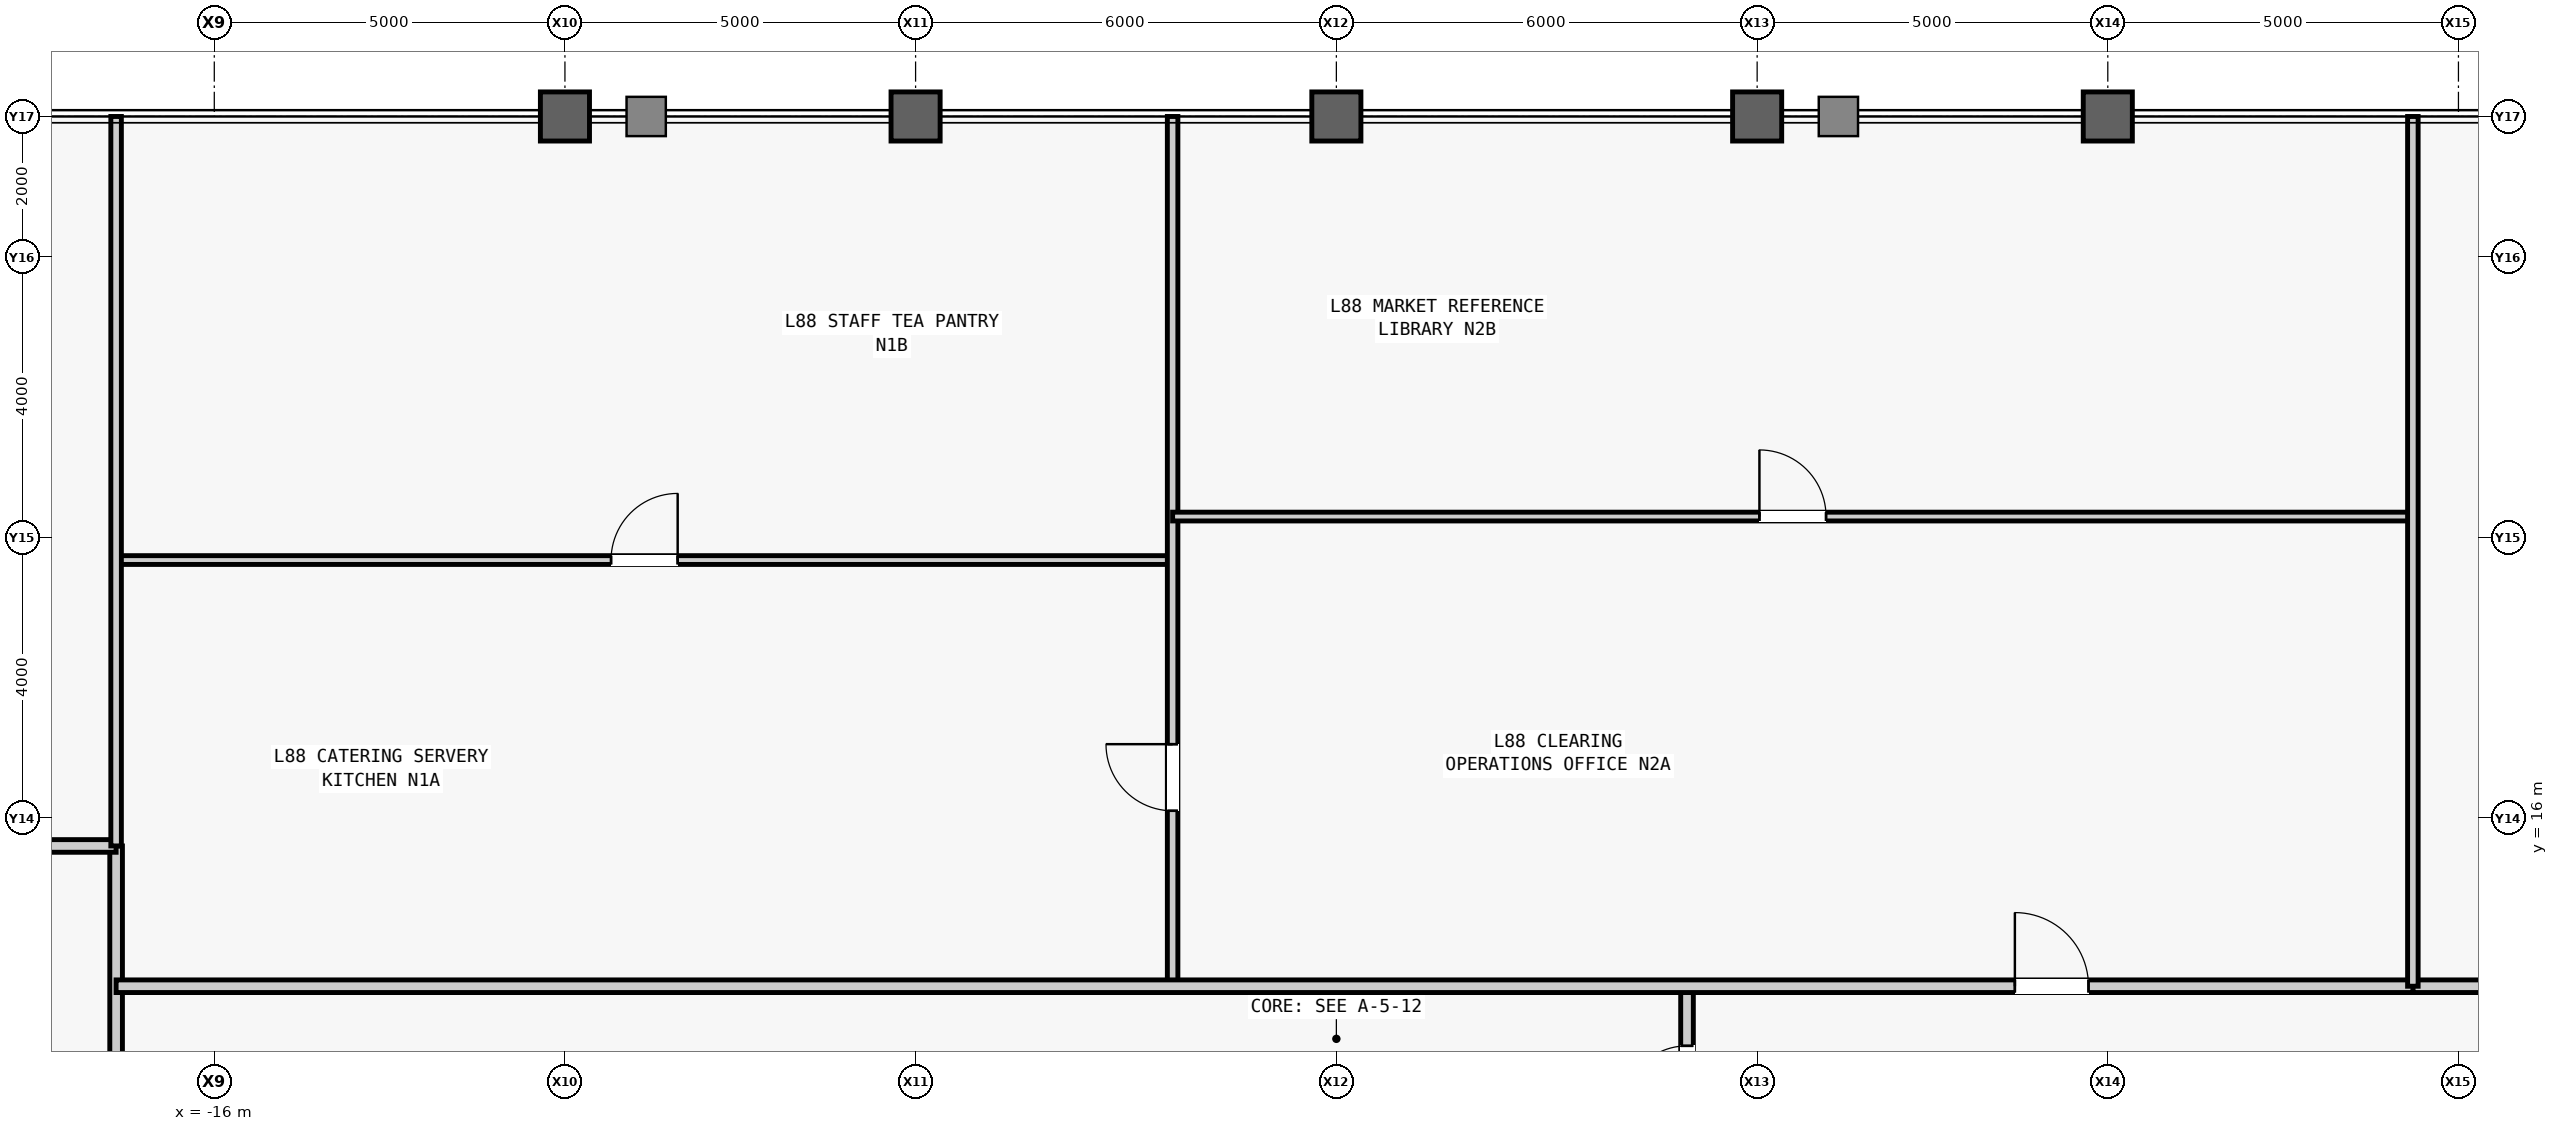
"""IFC4 building model, lengths in metres.
Left out: names, types, materials, properties, quantities, classifications, styles, units other than length and angle.
Written with IfcOpenShell. Run it as: python <this file> out.ifc"""

import sys

from ifc_helpers import new_model, si_unit, direction, frame, frame_2d, origin, origin_2d, place, context, subcontext, project, spatial, rectangle, hollow_rectangle, extrude, source, transform, mapped, element, fill, save


model = new_model("IFC4")
c1 = context("Model", 3, precision=1e-05, world=origin(), true_north=direction((0.0, 1.0)))
c2 = subcontext(c1, "Body", "Model", "MODEL_VIEW")
j1 = project(units=[si_unit("LENGTHUNIT", "METRE"), si_unit("PLANEANGLEUNIT", "RADIAN")], contexts=[c1])
p1 = place(None, origin())
s1 = spatial("IfcSite", under=j1, at=p1, CompositionType="ELEMENT")
p2 = place(p1, origin())
s2 = spatial("IfcBuilding", under=s1, at=p2, CompositionType="ELEMENT")
p3 = place(p2, frame((0.0, 0.0, 370.3)))
s3 = spatial("IfcBuildingStorey", under=s2, at=p3, CompositionType="ELEMENT", Elevation=370.3)
m1 = source(origin(), c2, "Body", "SweptSolid", [
    extrude(hollow_rectangle(XDim=0.7, YDim=0.7, WallThickness=0.04, at=origin_2d()), origin(), (0.0, 0.0, 1.0), 5.2),
])
for number, where, z_axis, x_axis in (
    (1, (-11.0, 26.0, 0.0), (0.0, 0.0, 1.0), (1.0, 0.0, 0.0)),
    (2, (-6.0, 26.0, 0.0), (0.0, 0.0, 1.0), (1.0, 0.0, 0.0)),
    (3, (0.0, 26.0, 0.0), (0.0, 0.0, 1.0), (1.0, 0.0, 0.0)),
    (4, (6.0, 26.0, 0.0), (0.0, 0.0, 1.0), (1.0, 0.0, 0.0)),
    (5, (11.0, 26.0, 0.0), (0.0, 0.0, 1.0), (1.0, 0.0, 0.0)),
):
    element("IfcColumn", number, at=place(p3, frame(where, z_axis=z_axis, x_axis=x_axis)), inside=s3, PredefinedType="COLUMN", context=c2, shape_type="MappedRepresentation", body=[
        mapped(m1, transform((0.0, 0.0, 0.0), scale=1.0)),
    ])
m2 = source(origin(), c2, "Body", "SweptSolid", [
    extrude(rectangle(XDim=8.4, YDim=0.18, at=frame_2d((4.2, 0.0))), origin(), (0.0, 0.0, 1.0), 4.6),
])
p4 = place(p3, frame((-17.4, 7.2, 0.0), z_axis=(0.0, 0.0, 1.0), x_axis=(0.0, 1.0, 0.0)))
e6 = element("IfcWall", 6, at=p4, inside=s3, PredefinedType="PARTITIONING", context=c2, shape_type="MappedRepresentation", body=[
    mapped(m2, transform((0.0, 0.0, 0.0), scale=1.0)),
])
m3 = source(origin(), c2, "Body", "SweptSolid", [
    extrude(rectangle(XDim=2.6, YDim=0.18, at=frame_2d((1.3, 0.0))), origin(), (0.0, 0.0, 1.0), 4.6),
])
p5 = place(p3, frame((5.0, 11.0, 0.0), z_axis=(0.0, 0.0, 1.0), x_axis=(0.0, 1.0, 0.0)))
e7 = element("IfcWall", 7, at=p5, inside=s3, PredefinedType="PARTITIONING", context=c2, shape_type="MappedRepresentation", body=[
    mapped(m3, transform((0.0, 0.0, 0.0), scale=1.0)),
])
m4 = source(origin(), c2, "Body", "SweptSolid", [
    extrude(rectangle(XDim=0.9, YDim=2.15, at=frame_2d((0.45, 1.075))), frame((0.0, 0.1, 0.0), z_axis=(0.0, -1.0, 0.0), x_axis=(1.0, 0.0, 0.0)), (0.0, 0.0, 1.0), 0.2),
])
p6 = place(p5, frame((0.85, 0.0, 0.0)))
e8 = element("IfcOpeningElement", 8, at=p6, cuts=e7, PredefinedType="OPENING", context=c2, shape_type="MappedRepresentation", body=[
    mapped(m4, transform((0.0, 0.0, 0.0), scale=1.0)),
])
m5 = source(origin(), c2, "Body", "SweptSolid", [
    extrude(rectangle(XDim=1.15, YDim=0.18, at=frame_2d((0.575, 0.0))), origin(), (0.0, 0.0, 1.0), 4.6),
])
p7 = place(p3, frame((-18.55, 15.6, 0.0), z_axis=(0.0, 0.0, 1.0), x_axis=(1.0, 0.0, 0.0)))
e9 = element("IfcWall", 9, at=p7, inside=s3, PredefinedType="PARTITIONING", context=c2, shape_type="MappedRepresentation", body=[
    mapped(m5, transform((0.0, 0.0, 0.0), scale=1.0)),
])
m6 = source(origin(), c2, "Body", "SweptSolid", [
    extrude(rectangle(XDim=2.4, YDim=0.18, at=frame_2d((1.2, 0.0))), origin(), (0.0, 0.0, 1.0), 4.6),
])
p8 = place(p3, frame((15.35, 13.6, 0.0), z_axis=(0.0, 0.0, 1.0), x_axis=(1.0, 0.0, 0.0)))
e10 = element("IfcWall", 10, at=p8, inside=s3, PredefinedType="PARTITIONING", context=c2, shape_type="MappedRepresentation", body=[
    mapped(m6, transform((0.0, 0.0, 0.0), scale=1.0)),
])
m7 = source(origin(), c2, "Body", "SweptSolid", [
    extrude(rectangle(XDim=15.065, YDim=0.125, at=frame_2d((7.532, 0.0))), origin(), (0.0, 0.0, 1.0), 4.253),
])
p9 = place(p3, frame((-17.4, 19.676, 0.0), z_axis=(0.0, 0.0, 1.0), x_axis=(1.0, 0.0, 0.0)))
e11 = element("IfcWall", 11, at=p9, inside=s3, PredefinedType="PARTITIONING", context=c2, shape_type="MappedRepresentation", body=[
    mapped(m7, transform((0.0, 0.0, 0.0), scale=1.0)),
])
m8 = source(origin(), c2, "Body", "SweptSolid", [
    extrude(rectangle(XDim=0.95, YDim=2.15, at=frame_2d((0.475, 1.075))), frame((0.0, 0.073, 0.0), z_axis=(0.0, -1.0, 0.0), x_axis=(1.0, 0.0, 0.0)), (0.0, 0.0, 1.0), 0.145),
])
p10 = place(p9, frame((7.058, 0.0, 0.0)))
e12 = element("IfcOpeningElement", 12, at=p10, cuts=e11, PredefinedType="OPENING", context=c2, shape_type="MappedRepresentation", body=[
    mapped(m8, transform((0.0, 0.0, 0.0), scale=1.0)),
])
m9 = source(origin(), c2, "Body", "SweptSolid", [
    extrude(rectangle(XDim=12.4, YDim=0.15, at=frame_2d((6.2, 0.0))), origin(), (0.0, 0.0, 1.0), 4.6),
])
p11 = place(p3, frame((-2.335, 13.6, 0.0), z_axis=(0.0, 0.0, 1.0), x_axis=(0.0, 1.0, 0.0)))
e13 = element("IfcWall", 13, at=p11, inside=s3, PredefinedType="PARTITIONING", context=c2, shape_type="MappedRepresentation", body=[
    mapped(m9, transform((0.0, 0.0, 0.0), scale=1.0)),
])
m10 = source(origin(), c2, "Body", "SweptSolid", [
    extrude(rectangle(XDim=0.95, YDim=2.15, at=frame_2d((0.475, 1.075))), frame((0.0, 0.085, 0.0), z_axis=(0.0, -1.0, 0.0), x_axis=(1.0, 0.0, 0.0)), (0.0, 0.0, 1.0), 0.17),
])
p12 = place(p11, frame((2.501, 0.0, 0.0)))
e14 = element("IfcOpeningElement", 14, at=p12, cuts=e13, PredefinedType="OPENING", context=c2, shape_type="MappedRepresentation", body=[
    mapped(m10, transform((0.0, 0.0, 0.0), scale=1.0)),
])
m11 = source(origin(), c2, "Body", "SweptSolid", [
    extrude(rectangle(XDim=17.685, YDim=0.125, at=frame_2d((8.843, 0.0))), origin(), (0.0, 0.0, 1.0), 4.6),
])
p13 = place(p3, frame((-2.335, 20.296, 0.0), z_axis=(0.0, 0.0, 1.0), x_axis=(1.0, 0.0, 0.0)))
e15 = element("IfcWall", 15, at=p13, inside=s3, PredefinedType="PARTITIONING", context=c2, shape_type="MappedRepresentation", body=[
    mapped(m11, transform((0.0, 0.0, 0.0), scale=1.0)),
])
p14 = place(p13, frame((8.367, 0.0, 0.0)))
e16 = element("IfcOpeningElement", 16, at=p14, cuts=e15, PredefinedType="OPENING", context=c2, shape_type="MappedRepresentation", body=[
    mapped(m8, transform((0.0, 0.0, 0.0), scale=1.0)),
])
m12 = source(origin(), c2, "Body", "SweptSolid", [
    extrude(rectangle(XDim=32.75, YDim=0.18, at=frame_2d((16.375, 0.0))), origin(), (0.0, 0.0, 1.0), 4.6),
])
p15 = place(p3, frame((-17.4, 13.6, 0.0), z_axis=(0.0, 0.0, 1.0), x_axis=(1.0, 0.0, 0.0)))
e17 = element("IfcWall", 17, at=p15, inside=s3, PredefinedType="PARTITIONING", context=c2, shape_type="MappedRepresentation", body=[
    mapped(m12, transform((0.0, 0.0, 0.0), scale=1.0)),
])
m13 = source(origin(), c2, "Body", "SweptSolid", [
    extrude(rectangle(XDim=1.05, YDim=2.2, at=frame_2d((0.525, 1.1))), frame((0.0, 0.1, 0.0), z_axis=(0.0, -1.0, 0.0), x_axis=(1.0, 0.0, 0.0)), (0.0, 0.0, 1.0), 0.2),
])
p16 = place(p15, frame((27.075, 0.0, 0.0)))
e18 = element("IfcOpeningElement", 18, at=p16, cuts=e17, PredefinedType="OPENING", context=c2, shape_type="MappedRepresentation", body=[
    mapped(m13, transform((0.0, 0.0, 0.0), scale=1.0)),
])
m14 = source(origin(), c2, "Body", "SweptSolid", [
    extrude(rectangle(XDim=10.4, YDim=0.15, at=frame_2d((5.2, 0.0))), origin(), (0.0, 0.0, 1.0), 4.6),
])
p17 = place(p3, frame((-17.4, 15.6, 0.0), z_axis=(0.0, 0.0, 1.0), x_axis=(0.0, 1.0, 0.0)))
e19 = element("IfcWall", 19, at=p17, inside=s3, PredefinedType="PARTITIONING", context=c2, shape_type="MappedRepresentation", body=[
    mapped(m14, transform((0.0, 0.0, 0.0), scale=1.0)),
])
p18 = place(p3, frame((15.35, 13.6, 0.0), z_axis=(0.0, 0.0, 1.0), x_axis=(0.0, 1.0, 0.0)))
e20 = element("IfcWall", 20, at=p18, inside=s3, PredefinedType="PARTITIONING", context=c2, shape_type="MappedRepresentation", body=[
    mapped(m9, transform((0.0, 0.0, 0.0), scale=1.0)),
])
m15 = source(origin(), c2, "Body", "SweptSolid", [
    extrude(rectangle(XDim=0.9, YDim=2.15, at=frame_2d((0.45, 1.075))), frame((0.0, 0.025, 0.0), z_axis=(0.0, -1.0, 0.0), x_axis=(1.0, 0.0, 0.0)), (0.0, 0.0, 1.0), 0.05),
])
p19 = place(p6, origin())
e21 = element("IfcDoor", 21, at=p19, inside=s3, OperationType="SINGLE_SWING_LEFT", PredefinedType="DOOR", context=c2, shape_type="MappedRepresentation", body=[
    mapped(m15, transform((0.0, 0.0, 0.0), scale=1.0)),
])
fill(e8, e21)
m16 = source(origin(), c2, "Body", "SweptSolid", [
    extrude(rectangle(XDim=0.95, YDim=2.15, at=frame_2d((0.475, 1.075))), frame((0.0, 0.025, 0.0), z_axis=(0.0, -1.0, 0.0), x_axis=(1.0, 0.0, 0.0)), (0.0, 0.0, 1.0), 0.05),
])
p20 = place(p10, origin())
e22 = element("IfcDoor", 22, at=p20, inside=s3, OperationType="SINGLE_SWING_RIGHT", PredefinedType="DOOR", context=c2, shape_type="MappedRepresentation", body=[
    mapped(m16, transform((0.0, 0.0, 0.0), scale=1.0)),
])
fill(e12, e22)
p21 = place(p12, origin())
e23 = element("IfcDoor", 23, at=p21, inside=s3, OperationType="SINGLE_SWING_RIGHT", PredefinedType="DOOR", context=c2, shape_type="MappedRepresentation", body=[
    mapped(m16, transform((0.0, 0.0, 0.0), scale=1.0)),
])
fill(e14, e23)
p22 = place(p14, origin())
e24 = element("IfcDoor", 24, at=p22, inside=s3, OperationType="SINGLE_SWING_LEFT", PredefinedType="DOOR", context=c2, shape_type="MappedRepresentation", body=[
    mapped(m16, transform((0.0, 0.0, 0.0), scale=1.0)),
])
fill(e16, e24)
m17 = source(origin(), c2, "Body", "SweptSolid", [
    extrude(rectangle(XDim=1.05, YDim=2.2, at=frame_2d((0.525, 1.1))), frame((0.0, 0.025, 0.0), z_axis=(0.0, -1.0, 0.0), x_axis=(1.0, 0.0, 0.0)), (0.0, 0.0, 1.0), 0.05),
])
p23 = place(p16, origin())
e25 = element("IfcDoor", 25, at=p23, inside=s3, OperationType="SINGLE_SWING_LEFT", PredefinedType="DOOR", context=c2, shape_type="MappedRepresentation", body=[
    mapped(m17, transform((0.0, 0.0, 0.0), scale=1.0)),
])
fill(e18, e25)
save(model, sys.argv[1])
